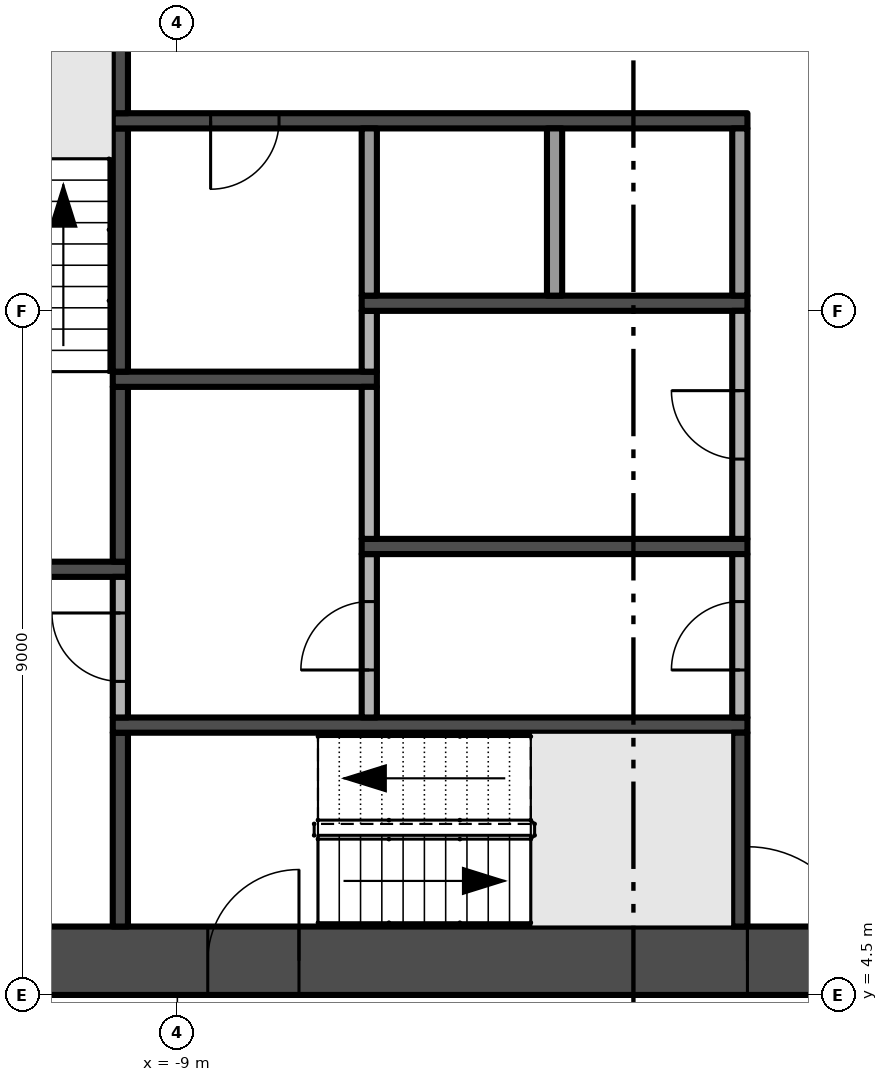
"""IFC4 building model, lengths in metres.
Left out: names, types, materials, properties, quantities, classifications, styles, units other than length and angle.
Written with IfcOpenShell. Run it as: python <this file> out.ifc"""

import sys

from ifc_helpers import new_model, si_unit, direction, frame, frame_2d, origin, place, context, subcontext, project, spatial, rectangle, extrude, element, fill, save


model = new_model("IFC4")
c1 = context("Model", 3, precision=1e-05, world=origin(), true_north=direction((0.0, 1.0)))
c2 = subcontext(c1, "Body", "Model", "MODEL_VIEW")
j1 = project(units=[si_unit("LENGTHUNIT", "METRE"), si_unit("PLANEANGLEUNIT", "RADIAN")], contexts=[c1])
p1 = place(None, origin())
s1 = spatial("IfcSite", under=j1, at=p1, CompositionType="ELEMENT")
p2 = place(p1, origin())
s2 = spatial("IfcBuilding", under=s1, at=p2, CompositionType="ELEMENT")
p3 = place(p2, frame((0.0, 0.0, 111.2)))
s3 = spatial("IfcBuildingStorey", under=s2, at=p3, CompositionType="ELEMENT", Elevation=111.2)
p4 = place(p3, frame((-13.5, 4.95, -0.3), z_axis=(0.0, 0.0, 1.0), x_axis=(1.0, 0.0, 0.0)))
e1 = element("IfcWall", 1, at=p4, inside=s3, PredefinedType="SHEAR", context=c2, shape_type="SweptSolid", body=[
    extrude(rectangle(XDim=27.0, YDim=0.9, at=frame_2d((13.5, 0.0))), origin(), (0.0, 0.0, 1.0), 3.8),
])
p5 = place(p4, frame((12.0, 0.0, 0.3)))
e2 = element("IfcOpeningElement", 2, at=p5, cuts=e1, PredefinedType="OPENING", context=c2, shape_type="SweptSolid", body=[
    extrude(rectangle(XDim=3.0, YDim=2.4, at=frame_2d((1.5, 1.2))), frame((0.0, 0.46, 0.0), z_axis=(0.0, -1.0, 0.0), x_axis=(1.0, 0.0, 0.0)), (0.0, 0.0, 1.0), 0.92),
])
p6 = place(p4, frame((4.9, 0.0, 0.3)))
e3 = element("IfcOpeningElement", 3, at=p6, cuts=e1, PredefinedType="OPENING", context=c2, shape_type="SweptSolid", body=[
    extrude(rectangle(XDim=1.2, YDim=2.2, at=frame_2d((0.6, 1.1))), frame((0.0, 0.46, 0.0), z_axis=(0.0, -1.0, 0.0), x_axis=(1.0, 0.0, 0.0)), (0.0, 0.0, 1.0), 0.92),
])
p7 = place(p4, frame((20.75, 0.0, 0.3)))
e4 = element("IfcOpeningElement", 4, at=p7, cuts=e1, PredefinedType="OPENING", context=c2, shape_type="SweptSolid", body=[
    extrude(rectangle(XDim=1.5, YDim=2.2, at=frame_2d((0.75, 1.1))), frame((0.0, 0.46, 0.0), z_axis=(0.0, -1.0, 0.0), x_axis=(1.0, 0.0, 0.0)), (0.0, 0.0, 1.0), 0.92),
])
p8 = place(p4, frame((17.4, 0.0, 0.3)))
e5 = element("IfcOpeningElement", 5, at=p8, cuts=e1, PredefinedType="OPENING", context=c2, shape_type="SweptSolid", body=[
    extrude(rectangle(XDim=1.2, YDim=2.2, at=frame_2d((0.6, 1.1))), frame((0.0, 0.46, 0.0), z_axis=(0.0, -1.0, 0.0), x_axis=(1.0, 0.0, 0.0)), (0.0, 0.0, 1.0), 0.92),
])
p9 = place(p3, frame((-12.6, 10.1, 0.0), z_axis=(0.0, 0.0, 1.0), x_axis=(1.0, 0.0, 0.0)))
e6 = element("IfcWall", 6, at=p9, inside=s3, PredefinedType="SHEAR", context=c2, shape_type="SweptSolid", body=[
    extrude(rectangle(XDim=2.95, YDim=0.2, at=frame_2d((1.475, 0.0))), origin(), (0.0, 0.0, 1.0), 3.5),
])
p10 = place(p3, frame((-9.75, 5.4, 0.0), z_axis=(0.0, 0.0, 1.0), x_axis=(0.0, 1.0, 0.0)))
e7 = element("IfcWall", 7, at=p10, inside=s3, PredefinedType="SHEAR", context=c2, shape_type="SweptSolid", body=[
    extrude(rectangle(XDim=2.55, YDim=0.2, at=frame_2d((1.275, 0.0))), origin(), (0.0, 0.0, 1.0), 3.5),
])
p11 = place(p3, frame((-9.85, 8.05, 0.0), z_axis=(0.0, 0.0, 1.0), x_axis=(1.0, 0.0, 0.0)))
e8 = element("IfcWall", 8, at=p11, inside=s3, PredefinedType="SHEAR", context=c2, shape_type="SweptSolid", body=[
    extrude(rectangle(XDim=8.35, YDim=0.2, at=frame_2d((4.175, 0.0))), origin(), (0.0, 0.0, 1.0), 3.5),
])
p12 = place(p3, frame((-9.75, 8.15, 0.0), z_axis=(0.0, 0.0, 1.0), x_axis=(0.0, 1.0, 0.0)))
e9 = element("IfcWall", 9, at=p12, inside=s3, PredefinedType="PARTITIONING", context=c2, shape_type="SweptSolid", body=[
    extrude(rectangle(XDim=1.85, YDim=0.2, at=frame_2d((0.925, 0.0))), origin(), (0.0, 0.0, 1.0), 3.5),
])
p13 = place(p12, frame((0.475, 0.0, 0.0)))
e10 = element("IfcOpeningElement", 10, at=p13, cuts=e9, PredefinedType="OPENING", context=c2, shape_type="SweptSolid", body=[
    extrude(rectangle(XDim=0.9, YDim=2.1, at=frame_2d((0.45, 1.05))), frame((0.0, 0.11, 0.0), z_axis=(0.0, -1.0, 0.0), x_axis=(1.0, 0.0, 0.0)), (0.0, 0.0, 1.0), 0.22),
])
p14 = place(p3, frame((-9.75, 10.2, 0.0), z_axis=(0.0, 0.0, 1.0), x_axis=(0.0, 1.0, 0.0)))
e11 = element("IfcWall", 11, at=p14, inside=s3, PredefinedType="SHEAR", context=c2, shape_type="SweptSolid", body=[
    extrude(rectangle(XDim=2.3, YDim=0.2, at=frame_2d((1.15, 0.0))), origin(), (0.0, 0.0, 1.0), 3.5),
])
p15 = place(p3, frame((-9.85, 12.6, 0.0), z_axis=(0.0, 0.0, 1.0), x_axis=(1.0, 0.0, 0.0)))
e12 = element("IfcWall", 12, at=p15, inside=s3, PredefinedType="SHEAR", context=c2, shape_type="SweptSolid", body=[
    extrude(rectangle(XDim=3.475, YDim=0.2, at=frame_2d((1.738, 0.0))), origin(), (0.0, 0.0, 1.0), 3.5),
])
p16 = place(p3, frame((-9.75, 12.7, 0.0), z_axis=(0.0, 0.0, 1.0), x_axis=(0.0, 1.0, 0.0)))
e13 = element("IfcWall", 13, at=p16, inside=s3, PredefinedType="SHEAR", context=c2, shape_type="SweptSolid", body=[
    extrude(rectangle(XDim=3.2, YDim=0.2, at=frame_2d((1.6, 0.0))), origin(), (0.0, 0.0, 1.0), 3.5),
])
p17 = place(p3, frame((-1.5, 16.0, 0.0), z_axis=(0.0, 0.0, 1.0), x_axis=(-1.0, 0.0, 0.0)))
e14 = element("IfcWall", 14, at=p17, inside=s3, PredefinedType="SHEAR", context=c2, shape_type="SweptSolid", body=[
    extrude(rectangle(XDim=8.35, YDim=0.2, at=frame_2d((4.175, 0.0))), origin(), (0.0, 0.0, 1.0), 3.5),
])
p18 = place(p17, frame((6.162, 0.0, 0.0)))
e15 = element("IfcOpeningElement", 15, at=p18, cuts=e14, PredefinedType="OPENING", context=c2, shape_type="SweptSolid", body=[
    extrude(rectangle(XDim=0.9, YDim=2.1, at=frame_2d((0.45, 1.05))), frame((0.0, 0.11, 0.0), z_axis=(0.0, -1.0, 0.0), x_axis=(1.0, 0.0, 0.0)), (0.0, 0.0, 1.0), 0.22),
])
p19 = place(p3, frame((-9.75, 16.1, 0.0), z_axis=(0.0, 0.0, 1.0), x_axis=(0.0, 1.0, 0.0)))
e16 = element("IfcWall", 16, at=p19, inside=s3, PredefinedType="SHEAR", context=c2, shape_type="SweptSolid", body=[
    extrude(rectangle(XDim=1.5, YDim=0.2, at=frame_2d((0.75, 0.0))), origin(), (0.0, 0.0, 1.0), 3.5),
])
p20 = place(p3, frame((-6.475, 8.15, 0.0), z_axis=(0.0, 0.0, 1.0), x_axis=(0.0, 1.0, 0.0)))
e17 = element("IfcWall", 17, at=p20, inside=s3, PredefinedType="PARTITIONING", context=c2, shape_type="SweptSolid", body=[
    extrude(rectangle(XDim=2.15, YDim=0.2, at=frame_2d((1.075, 0.0))), origin(), (0.0, 0.0, 1.0), 3.5),
])
p21 = place(p20, frame((0.625, 0.0, 0.0)))
e18 = element("IfcOpeningElement", 18, at=p21, cuts=e17, PredefinedType="OPENING", context=c2, shape_type="SweptSolid", body=[
    extrude(rectangle(XDim=0.9, YDim=2.1, at=frame_2d((0.45, 1.05))), frame((0.0, 0.11, 0.0), z_axis=(0.0, -1.0, 0.0), x_axis=(1.0, 0.0, 0.0)), (0.0, 0.0, 1.0), 0.22),
])
p22 = place(p3, frame((-6.575, 10.4, 0.0), z_axis=(0.0, 0.0, 1.0), x_axis=(1.0, 0.0, 0.0)))
e19 = element("IfcWall", 19, at=p22, inside=s3, PredefinedType="SHEAR", context=c2, shape_type="SweptSolid", body=[
    extrude(rectangle(XDim=5.075, YDim=0.2, at=frame_2d((2.538, 0.0))), origin(), (0.0, 0.0, 1.0), 3.5),
])
p23 = place(p3, frame((-6.475, 10.5, 0.0), z_axis=(0.0, 0.0, 1.0), x_axis=(0.0, 1.0, 0.0)))
e20 = element("IfcWall", 20, at=p23, inside=s3, PredefinedType="PARTITIONING", context=c2, shape_type="SweptSolid", body=[
    extrude(rectangle(XDim=2.0, YDim=0.2, at=frame_2d((1.0, 0.0))), origin(), (0.0, 0.0, 1.0), 3.5),
])
p24 = place(p3, frame((-6.475, 12.7, 0.0), z_axis=(0.0, 0.0, 1.0), x_axis=(0.0, 1.0, 0.0)))
e21 = element("IfcWall", 21, at=p24, inside=s3, PredefinedType="PARTITIONING", context=c2, shape_type="SweptSolid", body=[
    extrude(rectangle(XDim=0.8, YDim=0.2, at=frame_2d((0.4, 0.0))), origin(), (0.0, 0.0, 1.0), 3.5),
])
p25 = place(p3, frame((-6.575, 13.6, 0.0), z_axis=(0.0, 0.0, 1.0), x_axis=(1.0, 0.0, 0.0)))
e22 = element("IfcWall", 22, at=p25, inside=s3, PredefinedType="SHEAR", context=c2, shape_type="SweptSolid", body=[
    extrude(rectangle(XDim=5.075, YDim=0.2, at=frame_2d((2.538, 0.0))), origin(), (0.0, 0.0, 1.0), 3.5),
])
for number, where, z_axis, x_axis in (
    (23, (-6.475, 13.7, 0.0), (0.0, 0.0, 1.0), (0.0, 1.0, 0.0)),
    (24, (-4.037, 13.7, 0.0), (0.0, 0.0, 1.0), (0.0, 1.0, 0.0)),
):
    element("IfcWall", number, at=place(p3, frame(where, z_axis=z_axis, x_axis=x_axis)), inside=s3, PredefinedType="PARTITIONING", context=c2, shape_type="SweptSolid", body=[
        extrude(rectangle(XDim=2.2, YDim=0.2, at=frame_2d((1.1, 0.0))), origin(), (0.0, 0.0, 1.0), 3.5),
    ])
p26 = place(p3, frame((-1.6, 5.4, 0.0), z_axis=(0.0, 0.0, 1.0), x_axis=(0.0, 1.0, 0.0)))
e25 = element("IfcWall", 25, at=p26, inside=s3, PredefinedType="SHEAR", context=c2, shape_type="SweptSolid", body=[
    extrude(rectangle(XDim=2.55, YDim=0.2, at=frame_2d((1.275, 0.0))), origin(), (0.0, 0.0, 1.0), 3.5),
])
p27 = place(p3, frame((-1.6, 8.15, 0.0), z_axis=(0.0, 0.0, 1.0), x_axis=(0.0, 1.0, 0.0)))
e26 = element("IfcWall", 26, at=p27, inside=s3, PredefinedType="PARTITIONING", context=c2, shape_type="SweptSolid", body=[
    extrude(rectangle(XDim=2.15, YDim=0.2, at=frame_2d((1.075, 0.0))), origin(), (0.0, 0.0, 1.0), 3.5),
])
p28 = place(p27, frame((0.625, 0.0, 0.0)))
e27 = element("IfcOpeningElement", 27, at=p28, cuts=e26, PredefinedType="OPENING", context=c2, shape_type="SweptSolid", body=[
    extrude(rectangle(XDim=0.9, YDim=2.1, at=frame_2d((0.45, 1.05))), frame((0.0, 0.11, 0.0), z_axis=(0.0, -1.0, 0.0), x_axis=(1.0, 0.0, 0.0)), (0.0, 0.0, 1.0), 0.22),
])
p29 = place(p3, frame((-1.6, 10.5, 0.0), z_axis=(0.0, 0.0, 1.0), x_axis=(0.0, 1.0, 0.0)))
e28 = element("IfcWall", 28, at=p29, inside=s3, PredefinedType="PARTITIONING", context=c2, shape_type="SweptSolid", body=[
    extrude(rectangle(XDim=3.0, YDim=0.2, at=frame_2d((1.5, 0.0))), origin(), (0.0, 0.0, 1.0), 3.5),
])
p30 = place(p29, frame((1.05, 0.0, 0.0)))
e29 = element("IfcOpeningElement", 29, at=p30, cuts=e28, PredefinedType="OPENING", context=c2, shape_type="SweptSolid", body=[
    extrude(rectangle(XDim=0.9, YDim=2.1, at=frame_2d((0.45, 1.05))), frame((0.0, 0.11, 0.0), z_axis=(0.0, -1.0, 0.0), x_axis=(1.0, 0.0, 0.0)), (0.0, 0.0, 1.0), 0.22),
])
p31 = place(p3, frame((-1.6, 13.7, 0.0), z_axis=(0.0, 0.0, 1.0), x_axis=(0.0, 1.0, 0.0)))
e30 = element("IfcWall", 30, at=p31, inside=s3, PredefinedType="PARTITIONING", context=c2, shape_type="SweptSolid", body=[
    extrude(rectangle(XDim=2.2, YDim=0.2, at=frame_2d((1.1, 0.0))), origin(), (0.0, 0.0, 1.0), 3.5),
])
p32 = place(p5, frame((3.0, 0.0, 0.0), z_axis=(0.0, 0.0, 1.0), x_axis=(-1.0, 0.0, 0.0)))
e31 = element("IfcDoor", 31, at=p32, inside=s3, OperationType="DOUBLE_DOOR_SINGLE_SWING", PredefinedType="DOOR", context=c2, shape_type="SweptSolid", body=[
    extrude(rectangle(XDim=3.0, YDim=2.4, at=frame_2d((1.5, 1.2))), frame((0.0, 0.025, 0.0), z_axis=(0.0, -1.0, 0.0), x_axis=(1.0, 0.0, 0.0)), (0.0, 0.0, 1.0), 0.05),
])
fill(e2, e31)
p33 = place(p6, frame((1.2, 0.0, 0.0), z_axis=(0.0, 0.0, 1.0), x_axis=(-1.0, 0.0, 0.0)))
e32 = element("IfcDoor", 32, at=p33, inside=s3, OperationType="SINGLE_SWING_LEFT", PredefinedType="DOOR", context=c2, shape_type="SweptSolid", body=[
    extrude(rectangle(XDim=1.2, YDim=2.2, at=frame_2d((0.6, 1.1))), frame((0.0, 0.025, 0.0), z_axis=(0.0, -1.0, 0.0), x_axis=(1.0, 0.0, 0.0)), (0.0, 0.0, 1.0), 0.05),
])
fill(e3, e32)
p34 = place(p18, origin())
e33 = element("IfcDoor", 33, at=p34, inside=s3, OperationType="SINGLE_SWING_RIGHT", PredefinedType="DOOR", context=c2, shape_type="SweptSolid", body=[
    extrude(rectangle(XDim=0.9, YDim=2.1, at=frame_2d((0.45, 1.05))), frame((0.0, 0.025, 0.0), z_axis=(0.0, -1.0, 0.0), x_axis=(1.0, 0.0, 0.0)), (0.0, 0.0, 1.0), 0.05),
])
fill(e15, e33)
p35 = place(p28, origin())
e34 = element("IfcDoor", 34, at=p35, inside=s3, OperationType="SINGLE_SWING_LEFT", PredefinedType="DOOR", context=c2, shape_type="SweptSolid", body=[
    extrude(rectangle(XDim=0.9, YDim=2.1, at=frame_2d((0.45, 1.05))), frame((0.0, 0.025, 0.0), z_axis=(0.0, -1.0, 0.0), x_axis=(1.0, 0.0, 0.0)), (0.0, 0.0, 1.0), 0.05),
])
fill(e27, e34)
p36 = place(p30, origin())
e35 = element("IfcDoor", 35, at=p36, inside=s3, OperationType="SINGLE_SWING_RIGHT", PredefinedType="DOOR", context=c2, shape_type="SweptSolid", body=[
    extrude(rectangle(XDim=0.9, YDim=2.1, at=frame_2d((0.45, 1.05))), frame((0.0, 0.025, 0.0), z_axis=(0.0, -1.0, 0.0), x_axis=(1.0, 0.0, 0.0)), (0.0, 0.0, 1.0), 0.05),
])
fill(e29, e35)
p37 = place(p21, origin())
e36 = element("IfcDoor", 36, at=p37, inside=s3, OperationType="SINGLE_SWING_LEFT", PredefinedType="DOOR", context=c2, shape_type="SweptSolid", body=[
    extrude(rectangle(XDim=0.9, YDim=2.1, at=frame_2d((0.45, 1.05))), frame((0.0, 0.025, 0.0), z_axis=(0.0, -1.0, 0.0), x_axis=(1.0, 0.0, 0.0)), (0.0, 0.0, 1.0), 0.05),
])
fill(e18, e36)
p38 = place(p13, origin())
e37 = element("IfcDoor", 37, at=p38, inside=s3, OperationType="SINGLE_SWING_RIGHT", PredefinedType="DOOR", context=c2, shape_type="SweptSolid", body=[
    extrude(rectangle(XDim=0.9, YDim=2.1, at=frame_2d((0.45, 1.05))), frame((0.0, 0.025, 0.0), z_axis=(0.0, -1.0, 0.0), x_axis=(1.0, 0.0, 0.0)), (0.0, 0.0, 1.0), 0.05),
])
fill(e10, e37)
save(model, sys.argv[1])
